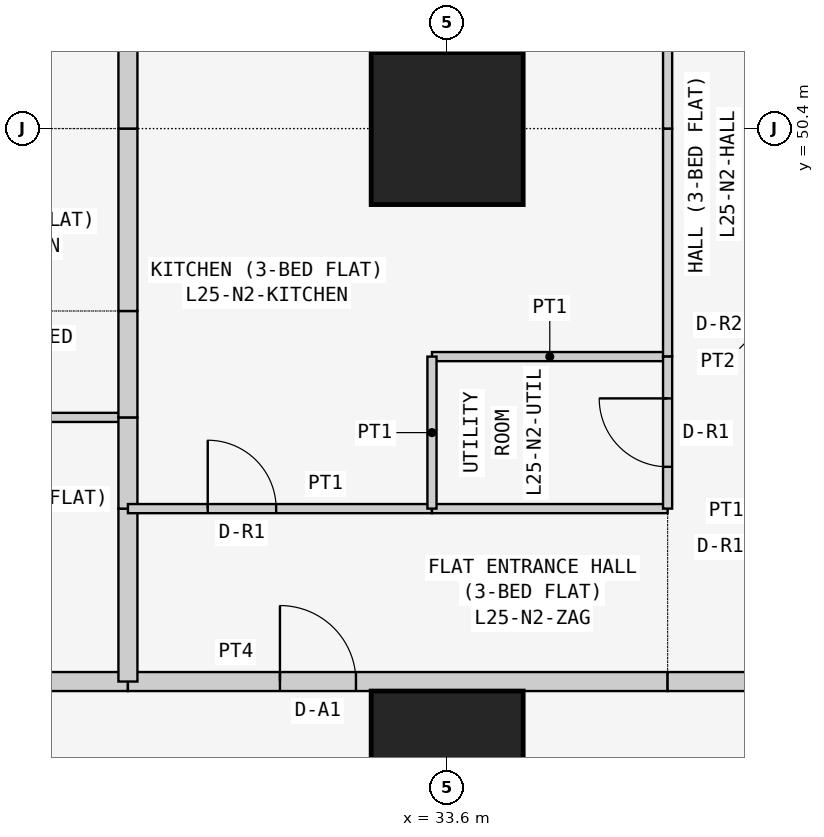
"""IFC4 building model, lengths in metres.
Left out: names, types, materials, properties, quantities, classifications, styles, units other than length and angle.
Written with IfcOpenShell. Run it as: python <this file> out.ifc"""

import sys

from ifc_helpers import new_model, si_unit, direction, frame, frame_2d, origin, origin_2d, place, context, subcontext, project, spatial, rectangle, extrude, element, fill, save


model = new_model("IFC4")
c1 = context("Model", 3, precision=1e-05, world=origin(), true_north=direction((0.0, 1.0)))
c2 = subcontext(c1, "Body", "Model", "MODEL_VIEW")
j1 = project(units=[si_unit("LENGTHUNIT", "METRE"), si_unit("PLANEANGLEUNIT", "RADIAN")], contexts=[c1])
p1 = place(None, origin())
s1 = spatial("IfcSite", under=j1, at=p1, CompositionType="ELEMENT")
p2 = place(p1, origin())
s2 = spatial("IfcBuilding", under=s1, at=p2, CompositionType="ELEMENT")
p3 = place(p2, frame((0.0, 0.0, 99.3)))
s3 = spatial("IfcBuildingStorey", under=s2, at=p3, CompositionType="ELEMENT", Elevation=99.3)
for number, where, z_axis, x_axis in (
    (1, (33.6, 42.0, 0.0), (0.0, 0.0, 1.0), (1.0, 0.0, 0.0)),
    (2, (33.6, 50.4, 0.0), (0.0, 0.0, 1.0), (1.0, 0.0, 0.0)),
):
    element("IfcColumn", number, at=place(p3, frame(where, z_axis=z_axis, x_axis=x_axis)), inside=s3, PredefinedType="COLUMN", context=c2, shape_type="SweptSolid", body=[
        extrude(rectangle(XDim=2.0, YDim=2.0, at=origin_2d()), origin(), (0.0, 0.0, 1.0), 3.6),
    ])
p4 = place(p3, frame((24.171, 43.125, 0.0), z_axis=(0.0, 0.0, 1.0), x_axis=(1.0, 0.0, 0.0)))
e3 = element("IfcWall", 3, at=p4, inside=s3, PredefinedType="PARTITIONING", context=c2, shape_type="SweptSolid", body=[
    extrude(rectangle(XDim=5.229, YDim=0.25, at=frame_2d((2.615, 0.0))), origin(), (0.0, 0.0, 1.0), 3.35),
])
p5 = place(p4, frame((2.179, 0.0, 0.0)))
e4 = element("IfcOpeningElement", 4, at=p5, cuts=e3, PredefinedType="OPENING", context=c2, shape_type="SweptSolid", body=[
    extrude(rectangle(XDim=1.0, YDim=2.1, at=frame_2d((0.5, 1.05))), frame((0.0, 0.135, 0.0), z_axis=(0.0, -1.0, 0.0), x_axis=(1.0, 0.0, 0.0)), (0.0, 0.0, 1.0), 0.27),
])
p6 = place(p3, frame((29.4, 43.125, 0.0), z_axis=(0.0, 0.0, 1.0), x_axis=(1.0, 0.0, 0.0)))
e5 = element("IfcWall", 5, at=p6, inside=s3, PredefinedType="PARTITIONING", context=c2, shape_type="SweptSolid", body=[
    extrude(rectangle(XDim=7.1, YDim=0.25, at=frame_2d((3.55, 0.0))), origin(), (0.0, 0.0, 1.0), 3.35),
])
p7 = place(p6, frame((2.0, 0.0, 0.0)))
e6 = element("IfcOpeningElement", 6, at=p7, cuts=e5, PredefinedType="OPENING", context=c2, shape_type="SweptSolid", body=[
    extrude(rectangle(XDim=1.0, YDim=2.1, at=frame_2d((0.5, 1.05))), frame((0.0, 0.135, 0.0), z_axis=(0.0, -1.0, 0.0), x_axis=(1.0, 0.0, 0.0)), (0.0, 0.0, 1.0), 0.27),
])
p8 = place(p3, frame((36.5, 43.125, 0.0), z_axis=(0.0, 0.0, 1.0), x_axis=(1.0, 0.0, 0.0)))
e7 = element("IfcWall", 7, at=p8, inside=s3, PredefinedType="PARTITIONING", context=c2, shape_type="SweptSolid", body=[
    extrude(rectangle(XDim=1.2, YDim=0.25, at=frame_2d((0.6, 0.0))), origin(), (0.0, 0.0, 1.0), 3.35),
])
p9 = place(p3, frame((29.4, 46.6, 0.0), z_axis=(0.0, 0.0, 1.0), x_axis=(-1.0, 0.0, 0.0)))
e8 = element("IfcWall", 8, at=p9, inside=s3, PredefinedType="PARTITIONING", context=c2, shape_type="SweptSolid", body=[
    extrude(rectangle(XDim=5.229, YDim=0.12, at=frame_2d((2.615, 0.0))), origin(), (0.0, 0.0, 1.0), 3.35),
])
p10 = place(p3, frame((29.4, 43.125, 0.0), z_axis=(0.0, 0.0, 1.0), x_axis=(0.0, 1.0, 0.0)))
e9 = element("IfcWall", 9, at=p10, inside=s3, PredefinedType="PARTITIONING", context=c2, shape_type="SweptSolid", body=[
    extrude(rectangle(XDim=2.275, YDim=0.25, at=frame_2d((1.137, 0.0))), origin(), (0.0, 0.0, 1.0), 2.667),
])
p11 = place(p3, frame((29.4, 45.4, 0.0), z_axis=(0.0, 0.0, 1.0), x_axis=(0.0, 1.0, 0.0)))
e10 = element("IfcWall", 10, at=p11, inside=s3, PredefinedType="PARTITIONING", context=c2, shape_type="SweptSolid", body=[
    extrude(rectangle(XDim=1.2, YDim=0.25, at=frame_2d((0.6, 0.0))), origin(), (0.0, 0.0, 1.0), 2.667),
])
p12 = place(p3, frame((29.4, 46.6, 0.0), z_axis=(0.0, 0.0, 1.0), x_axis=(0.0, 1.0, 0.0)))
e11 = element("IfcWall", 11, at=p12, inside=s3, PredefinedType="PARTITIONING", context=c2, shape_type="SweptSolid", body=[
    extrude(rectangle(XDim=1.4, YDim=0.25, at=frame_2d((0.7, 0.0))), origin(), (0.0, 0.0, 1.0), 2.667),
])
p13 = place(p3, frame((29.4, 48.0, 0.0), z_axis=(0.0, 0.0, 1.0), x_axis=(0.0, 1.0, 0.0)))
e12 = element("IfcWall", 12, at=p13, inside=s3, PredefinedType="PARTITIONING", context=c2, shape_type="SweptSolid", body=[
    extrude(rectangle(XDim=2.4, YDim=0.25, at=frame_2d((1.2, 0.0))), origin(), (0.0, 0.0, 1.0), 2.667),
])
p14 = place(p3, frame((29.4, 50.4, 0.0), z_axis=(0.0, 0.0, 1.0), x_axis=(0.0, 1.0, 0.0)))
e13 = element("IfcWall", 13, at=p14, inside=s3, PredefinedType="PARTITIONING", context=c2, shape_type="SweptSolid", body=[
    extrude(rectangle(XDim=9.05, YDim=0.25, at=frame_2d((4.525, 0.0))), origin(), (0.0, 0.0, 1.0), 2.667),
])
p15 = place(p3, frame((29.4, 45.4, 0.0), z_axis=(0.0, 0.0, 1.0), x_axis=(1.0, 0.0, 0.0)))
e14 = element("IfcWall", 14, at=p15, inside=s3, PredefinedType="PARTITIONING", context=c2, shape_type="SweptSolid", body=[
    extrude(rectangle(XDim=4.0, YDim=0.12, at=frame_2d((2.0, 0.0))), origin(), (0.0, 0.0, 1.0), 3.35),
])
p16 = place(p15, frame((1.05, 0.0, 0.0)))
e15 = element("IfcOpeningElement", 15, at=p16, cuts=e14, PredefinedType="OPENING", context=c2, shape_type="SweptSolid", body=[
    extrude(rectangle(XDim=0.9, YDim=2.1, at=frame_2d((0.45, 1.05))), frame((0.0, 0.07, 0.0), z_axis=(0.0, -1.0, 0.0), x_axis=(1.0, 0.0, 0.0)), (0.0, 0.0, 1.0), 0.14),
])
for number, where, z_axis, x_axis in (
    (16, (33.4, 45.4, 0.0), (0.0, 0.0, 1.0), (1.0, 0.0, 0.0)),
    (17, (36.5, 47.4, 0.0), (0.0, 0.0, 1.0), (-1.0, 0.0, 0.0)),
):
    element("IfcWall", number, at=place(p3, frame(where, z_axis=z_axis, x_axis=x_axis)), inside=s3, PredefinedType="PARTITIONING", context=c2, shape_type="SweptSolid", body=[
        extrude(rectangle(XDim=3.1, YDim=0.12, at=frame_2d((1.55, 0.0))), origin(), (0.0, 0.0, 1.0), 3.35),
    ])
p17 = place(p3, frame((33.4, 47.4, 0.0), z_axis=(0.0, 0.0, 1.0), x_axis=(0.0, -1.0, 0.0)))
e18 = element("IfcWall", 18, at=p17, inside=s3, PredefinedType="PARTITIONING", context=c2, shape_type="SweptSolid", body=[
    extrude(rectangle(XDim=2.0, YDim=0.12, at=frame_2d((1.0, 0.0))), origin(), (0.0, 0.0, 1.0), 3.35),
])
p18 = place(p3, frame((36.5, 50.4, 0.0), z_axis=(0.0, 0.0, 1.0), x_axis=(0.0, -1.0, 0.0)))
e19 = element("IfcWall", 19, at=p18, inside=s3, PredefinedType="PARTITIONING", context=c2, shape_type="SweptSolid", body=[
    extrude(rectangle(XDim=3.0, YDim=0.12, at=frame_2d((1.5, 0.0))), origin(), (0.0, 0.0, 1.0), 3.35),
])
p19 = place(p3, frame((36.5, 47.4, 0.0), z_axis=(0.0, 0.0, 1.0), x_axis=(0.0, -1.0, 0.0)))
e20 = element("IfcWall", 20, at=p19, inside=s3, PredefinedType="PARTITIONING", context=c2, shape_type="SweptSolid", body=[
    extrude(rectangle(XDim=2.0, YDim=0.12, at=frame_2d((1.0, 0.0))), origin(), (0.0, 0.0, 1.0), 3.35),
])
p20 = place(p19, frame((0.55, 0.0, 0.0)))
e21 = element("IfcOpeningElement", 21, at=p20, cuts=e20, PredefinedType="OPENING", context=c2, shape_type="SweptSolid", body=[
    extrude(rectangle(XDim=0.9, YDim=2.1, at=frame_2d((0.45, 1.05))), frame((0.0, 0.07, 0.0), z_axis=(0.0, -1.0, 0.0), x_axis=(1.0, 0.0, 0.0)), (0.0, 0.0, 1.0), 0.14),
])
p21 = place(p3, frame((36.5, 55.3, 0.0), z_axis=(0.0, 0.0, 1.0), x_axis=(0.0, -1.0, 0.0)))
e22 = element("IfcWall", 22, at=p21, inside=s3, PredefinedType="PARTITIONING", context=c2, shape_type="SweptSolid", body=[
    extrude(rectangle(XDim=4.9, YDim=0.12, at=frame_2d((2.45, 0.0))), origin(), (0.0, 0.0, 1.0), 3.35),
])
p22 = place(p21, frame((1.85, 0.0, 0.0)))
e23 = element("IfcOpeningElement", 23, at=p22, cuts=e22, PredefinedType="OPENING", context=c2, shape_type="SweptSolid", body=[
    extrude(rectangle(XDim=0.9, YDim=2.1, at=frame_2d((0.45, 1.05))), frame((0.0, 0.07, 0.0), z_axis=(0.0, -1.0, 0.0), x_axis=(1.0, 0.0, 0.0)), (0.0, 0.0, 1.0), 0.14),
])
p23 = place(p7, origin())
e24 = element("IfcDoor", 24, at=p23, inside=s3, OperationType="SINGLE_SWING_LEFT", PredefinedType="DOOR", context=c2, shape_type="SweptSolid", body=[
    extrude(rectangle(XDim=1.0, YDim=2.1, at=frame_2d((0.5, 1.05))), frame((0.0, 0.025, 0.0), z_axis=(0.0, -1.0, 0.0), x_axis=(1.0, 0.0, 0.0)), (0.0, 0.0, 1.0), 0.05),
])
fill(e6, e24)
p24 = place(p16, origin())
e25 = element("IfcDoor", 25, at=p24, inside=s3, OperationType="SINGLE_SWING_LEFT", PredefinedType="DOOR", context=c2, shape_type="SweptSolid", body=[
    extrude(rectangle(XDim=0.9, YDim=2.1, at=frame_2d((0.45, 1.05))), frame((0.0, 0.025, 0.0), z_axis=(0.0, -1.0, 0.0), x_axis=(1.0, 0.0, 0.0)), (0.0, 0.0, 1.0), 0.05),
])
fill(e15, e25)
p25 = place(p20, frame((0.9, 0.0, 0.0), z_axis=(0.0, 0.0, 1.0), x_axis=(-1.0, 0.0, 0.0)))
e26 = element("IfcDoor", 26, at=p25, inside=s3, OperationType="SINGLE_SWING_RIGHT", PredefinedType="DOOR", context=c2, shape_type="SweptSolid", body=[
    extrude(rectangle(XDim=0.9, YDim=2.1, at=frame_2d((0.45, 1.05))), frame((0.0, 0.025, 0.0), z_axis=(0.0, -1.0, 0.0), x_axis=(1.0, 0.0, 0.0)), (0.0, 0.0, 1.0), 0.05),
])
fill(e21, e26)
save(model, sys.argv[1])
